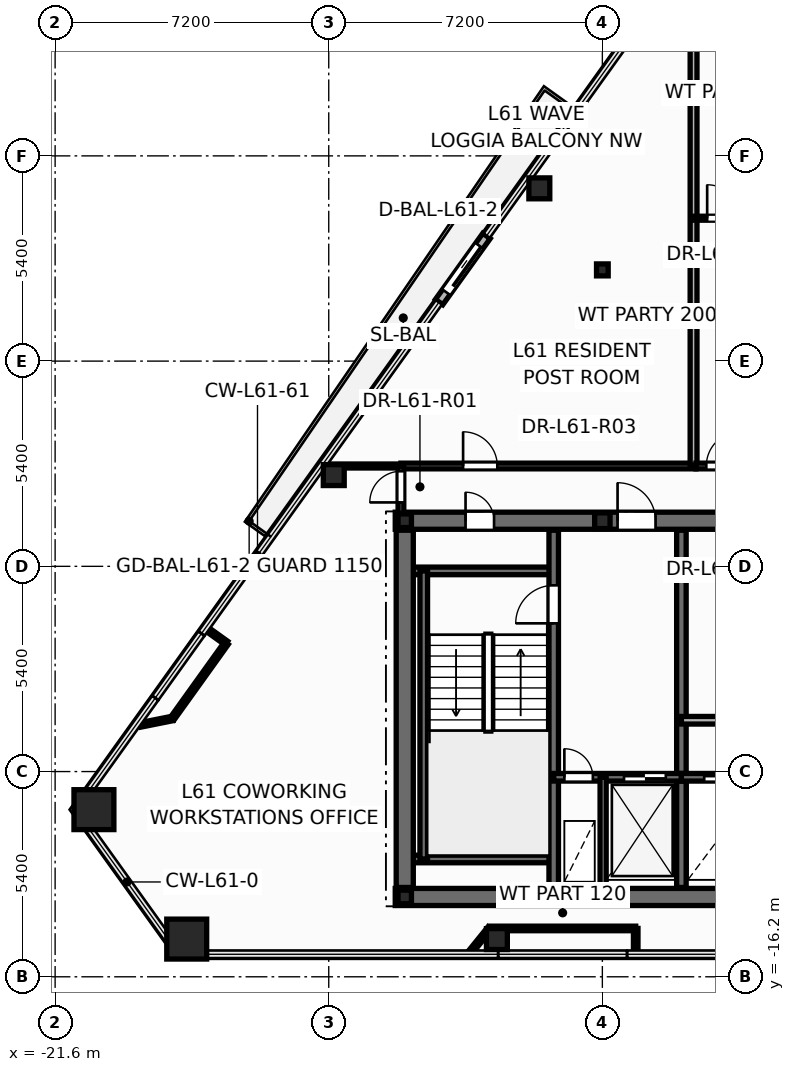
"""IFC4 building model, lengths in metres.
Left out: names, types, materials, properties, quantities, classifications, styles, units other than length and angle.
Written with IfcOpenShell. Run it as: python <this file> out.ifc"""

import sys

from ifc_helpers import new_model, si_unit, direction, frame, frame_2d, origin, origin_2d, place, context, subcontext, project, spatial, rectangle, hollow_rectangle, hollow_circle, i_section, extrude, element, fill, save


model = new_model("IFC4")
c1 = context("Model", 3, precision=1e-05, world=origin(), true_north=direction((0.0, 1.0)))
c2 = subcontext(c1, "Body", "Model", "MODEL_VIEW")
j1 = project(units=[si_unit("LENGTHUNIT", "METRE"), si_unit("PLANEANGLEUNIT", "RADIAN")], contexts=[c1])
p1 = place(None, origin())
s1 = spatial("IfcSite", under=j1, at=p1, CompositionType="ELEMENT")
p2 = place(p1, origin())
s2 = spatial("IfcBuilding", under=s1, at=p2, CompositionType="ELEMENT")
p3 = place(p2, frame((0.0, 0.0, 233.4)))
s3 = spatial("IfcBuildingStorey", under=s2, at=p3, CompositionType="ELEMENT", Elevation=233.4)
for number, where, z_axis, x_axis in (
    (1, (-20.579, -11.802, 0.0), (0.0, 0.0, 1.0), (1.0, 0.0, 0.0)),
    (2, (-18.137, -15.208, 0.0), (0.0, 0.0, 1.0), (1.0, 0.0, 0.0)),
):
    element("IfcColumn", number, at=place(p3, frame(where, z_axis=z_axis, x_axis=x_axis)), inside=s3, PredefinedType="COLUMN", context=c2, shape_type="SweptSolid", body=[
        extrude(hollow_rectangle(XDim=1.05, YDim=1.05, WallThickness=0.045, at=origin_2d()), origin(), (0.0, 0.0, 1.0), 3.6),
    ])
for number, where, z_axis, x_axis in (
    (3, (-9.976, -15.208, 0.0), (0.0, 0.0, 1.0), (1.0, 0.0, 0.0)),
    (4, (-8.858, 4.546, 0.0), (0.0, 0.0, 1.0), (1.0, 0.0, 0.0)),
    (5, (-14.268, -2.999, 0.0), (0.0, 0.0, 1.0), (1.0, 0.0, 0.0)),
):
    element("IfcColumn", number, at=place(p3, frame(where, z_axis=z_axis, x_axis=x_axis)), inside=s3, PredefinedType="COLUMN", context=c2, shape_type="SweptSolid", body=[
        extrude(hollow_circle(Radius=0.275, WallThickness=0.024, at=origin_2d()), origin(), (0.0, 0.0, 1.0), 3.6),
    ])
for number, where, z_axis, x_axis in (
    (6, (-12.4, -14.1, 0.0), (0.0, 0.0, 1.0), (1.0, 0.0, 0.0)),
    (7, (-12.4, -4.2, 0.0), (0.0, 0.0, 1.0), (1.0, 0.0, 0.0)),
):
    element("IfcColumn", number, at=place(p3, frame(where, z_axis=z_axis, x_axis=x_axis)), inside=s3, PredefinedType="COLUMN", context=c2, shape_type="SweptSolid", body=[
        extrude(i_section(OverallWidth=0.352, OverallDepth=0.359, WebThickness=0.018, FlangeThickness=0.026, at=origin_2d()), origin(), (0.0, 0.0, 1.0), 3.6),
    ])
p4 = place(p3, frame((-7.2, -4.2, 0.0), z_axis=(0.0, 0.0, 1.0), x_axis=(1.0, 0.0, 0.0)))
e8 = element("IfcColumn", 8, at=p4, inside=s3, PredefinedType="PILASTER", context=c2, shape_type="SweptSolid", body=[
    extrude(i_section(OverallWidth=0.405, OverallDepth=0.414, WebThickness=0.022, FlangeThickness=0.032, at=origin_2d()), origin(), (0.0, 0.0, 1.0), 3.6),
])
p5 = place(p3, frame((-7.2, 2.4, 0.0), z_axis=(0.0, 0.0, 1.0), x_axis=(1.0, 0.0, 0.0)))
e9 = element("IfcColumn", 9, at=p5, inside=s3, PredefinedType="COLUMN", context=c2, shape_type="SweptSolid", body=[
    extrude(i_section(OverallWidth=0.307, OverallDepth=0.314, WebThickness=0.012, FlangeThickness=0.019, at=origin_2d()), origin(), (0.0, 0.0, 1.0), 3.6),
])
p6 = place(p3, frame((-10.249, 3.293, -0.015), z_axis=(0.0, 0.0, 1.0), x_axis=(-0.58265081445, -0.812722602381, 0.0)))
e10 = element("IfcWall", 10, at=p6, inside=s3, PredefinedType="STANDARD", context=c2, shape_type="SweptSolid", body=[
    extrude(rectangle(XDim=2.14, YDim=0.24, at=frame_2d((1.07, 0.0))), origin(), (0.0, 0.0, 1.0), 2.878),
])
p7 = place(p6, frame((0.32, 0.0, 0.015)))
e11 = element("IfcOpeningElement", 11, at=p7, cuts=e10, PredefinedType="OPENING", context=c2, shape_type="SweptSolid", body=[
    extrude(rectangle(XDim=1.506, YDim=2.204, at=frame_2d((0.75, 1.102))), frame((0.0, 0.13, 0.0), z_axis=(0.0, -1.0, 0.0), x_axis=(1.0, 0.0, 0.0)), (0.0, 0.0, 1.0), 0.26),
])
p8 = place(p3, frame((-12.65, -14.1, 0.0), z_axis=(0.0, 0.0, 1.0), x_axis=(1.0, 0.0, 0.0)))
e12 = element("IfcWall", 12, at=p8, inside=s3, PredefinedType="SHEAR", context=c2, shape_type="SweptSolid", body=[
    extrude(rectangle(XDim=25.3, YDim=0.45, at=frame_2d((12.65, 0.0))), origin(), (0.0, 0.0, 1.0), 3.6),
])
p9 = place(p3, frame((-12.65, -4.2, 0.0), z_axis=(0.0, 0.0, 1.0), x_axis=(1.0, 0.0, 0.0)))
e13 = element("IfcWall", 13, at=p9, inside=s3, PredefinedType="SHEAR", context=c2, shape_type="SweptSolid", body=[
    extrude(rectangle(XDim=25.3, YDim=0.45, at=frame_2d((12.65, 0.0))), origin(), (0.0, 0.0, 1.0), 3.6),
])
p10 = place(p9, frame((1.85, 0.0, 0.0)))
e14 = element("IfcOpeningElement", 14, at=p10, cuts=e13, PredefinedType="OPENING", context=c2, shape_type="SweptSolid", body=[
    extrude(rectangle(XDim=0.756, YDim=2.054, at=frame_2d((0.375, 1.027))), frame((0.0, 0.235, 0.0), z_axis=(0.0, -1.0, 0.0), x_axis=(1.0, 0.0, 0.0)), (0.0, 0.0, 1.0), 0.47),
])
p11 = place(p9, frame((21.85, 0.0, 0.0)))
e15 = element("IfcOpeningElement", 15, at=p11, cuts=e13, PredefinedType="OPENING", context=c2, shape_type="SweptSolid", body=[
    extrude(rectangle(XDim=0.756, YDim=2.054, at=frame_2d((0.375, 1.027))), frame((0.0, 0.235, 0.0), z_axis=(0.0, -1.0, 0.0), x_axis=(1.0, 0.0, 0.0)), (0.0, 0.0, 1.0), 0.47),
])
p12 = place(p9, frame((23.5, 0.0, 0.0)))
e16 = element("IfcOpeningElement", 16, at=p12, cuts=e13, PredefinedType="OPENING", context=c2, shape_type="SweptSolid", body=[
    extrude(rectangle(XDim=0.756, YDim=2.054, at=frame_2d((0.375, 1.027))), frame((0.0, 0.235, 0.0), z_axis=(0.0, -1.0, 0.0), x_axis=(1.0, 0.0, 0.0)), (0.0, 0.0, 1.0), 0.47),
])
p13 = place(p9, frame((5.85, 0.0, 0.0)))
e17 = element("IfcOpeningElement", 17, at=p13, cuts=e13, PredefinedType="OPENING", context=c2, shape_type="SweptSolid", body=[
    extrude(rectangle(XDim=1.006, YDim=2.104, at=frame_2d((0.5, 1.052))), frame((0.0, 0.235, 0.0), z_axis=(0.0, -1.0, 0.0), x_axis=(1.0, 0.0, 0.0)), (0.0, 0.0, 1.0), 0.47),
])
p14 = place(p9, frame((10.35, 0.0, 0.0)))
e18 = element("IfcOpeningElement", 18, at=p14, cuts=e13, PredefinedType="OPENING", context=c2, shape_type="SweptSolid", body=[
    extrude(rectangle(XDim=1.406, YDim=2.154, at=frame_2d((0.7, 1.077))), frame((0.0, 0.235, 0.0), z_axis=(0.0, -1.0, 0.0), x_axis=(1.0, 0.0, 0.0)), (0.0, 0.0, 1.0), 0.47),
])
p15 = place(p9, frame((18.45, 0.0, 0.0)))
e19 = element("IfcOpeningElement", 19, at=p15, cuts=e13, PredefinedType="OPENING", context=c2, shape_type="SweptSolid", body=[
    extrude(rectangle(XDim=1.006, YDim=2.104, at=frame_2d((0.5, 1.052))), frame((0.0, 0.235, 0.0), z_axis=(0.0, -1.0, 0.0), x_axis=(1.0, 0.0, 0.0)), (0.0, 0.0, 1.0), 0.47),
])
for number, where, z_axis, x_axis in (
    (20, (-12.35, -5.52, 0.0), (0.0, 0.0, 1.0), (1.0, 0.0, 0.0)),
    (21, (-12.35, -13.1, 0.0), (0.0, 0.0, 1.0), (1.0, 0.0, 0.0)),
):
    element("IfcWall", number, at=place(p3, frame(where, z_axis=z_axis, x_axis=x_axis)), inside=s3, PredefinedType="SOLIDWALL", context=c2, shape_type="SweptSolid", body=[
        extrude(rectangle(XDim=3.87, YDim=0.2, at=frame_2d((1.935, 0.0))), origin(), (0.0, 0.0, 1.0), 3.6),
    ])
p16 = place(p3, frame((-11.9, -13.1, 0.0), z_axis=(0.0, 0.0, 1.0), x_axis=(0.0, 1.0, 0.0)))
e22 = element("IfcWall", 22, at=p16, inside=s3, PredefinedType="SOLIDWALL", context=c2, shape_type="SweptSolid", body=[
    extrude(rectangle(XDim=7.58, YDim=0.2, at=frame_2d((3.79, 0.0))), origin(), (0.0, 0.0, 1.0), 3.6),
])
p17 = place(p3, frame((-8.48, -13.85, 0.0), z_axis=(0.0, 0.0, 1.0), x_axis=(0.0, 1.0, 0.0)))
e23 = element("IfcWall", 23, at=p17, inside=s3, PredefinedType="SHEAR", context=c2, shape_type="SweptSolid", body=[
    extrude(rectangle(XDim=9.4, YDim=0.25, at=frame_2d((4.7, 0.0))), origin(), (0.0, 0.0, 1.0), 3.6),
])
p18 = place(p17, frame((6.95, 0.0, 0.0)))
e24 = element("IfcOpeningElement", 24, at=p18, cuts=e23, PredefinedType="OPENING", context=c2, shape_type="SweptSolid", body=[
    extrude(rectangle(XDim=1.006, YDim=2.104, at=frame_2d((0.5, 1.052))), frame((0.0, 0.135, 0.0), z_axis=(0.0, -1.0, 0.0), x_axis=(1.0, 0.0, 0.0)), (0.0, 0.0, 1.0), 0.27),
])
p19 = place(p3, frame((-5.12, -13.85, 0.0), z_axis=(0.0, 0.0, 1.0), x_axis=(0.0, 1.0, 0.0)))
e25 = element("IfcWall", 25, at=p19, inside=s3, PredefinedType="SHEAR", context=c2, shape_type="SweptSolid", body=[
    extrude(rectangle(XDim=9.4, YDim=0.25, at=frame_2d((4.7, 0.0))), origin(), (0.0, 0.0, 1.0), 3.6),
])
p20 = place(p3, frame((-8.48, -10.95, 0.0), z_axis=(0.0, 0.0, 1.0), x_axis=(1.0, 0.0, 0.0)))
e26 = element("IfcWall", 26, at=p20, inside=s3, PredefinedType="SOLIDWALL", context=c2, shape_type="SweptSolid", body=[
    extrude(rectangle(XDim=3.36, YDim=0.2, at=frame_2d((1.68, 0.0))), origin(), (0.0, 0.0, 1.0), 3.6),
])
p21 = place(p20, frame((0.28, 0.0, 0.0)))
e27 = element("IfcOpeningElement", 27, at=p21, cuts=e26, PredefinedType="OPENING", context=c2, shape_type="SweptSolid", body=[
    extrude(rectangle(XDim=0.756, YDim=2.054, at=frame_2d((0.375, 1.027))), frame((0.0, 0.11, 0.0), z_axis=(0.0, -1.0, 0.0), x_axis=(1.0, 0.0, 0.0)), (0.0, 0.0, 1.0), 0.22),
])
p22 = place(p20, frame((1.85, 0.0, 0.0)))
e28 = element("IfcOpeningElement", 28, at=p22, cuts=e26, PredefinedType="OPENING", context=c2, shape_type="SweptSolid", body=[
    extrude(rectangle(XDim=1.106, YDim=2.104, at=frame_2d((0.55, 1.052))), frame((0.0, 0.11, 0.0), z_axis=(0.0, -1.0, 0.0), x_axis=(1.0, 0.0, 0.0)), (0.0, 0.0, 1.0), 0.22),
])
p23 = place(p3, frame((-5.12, -10.95, 0.0), z_axis=(0.0, 0.0, 1.0), x_axis=(1.0, 0.0, 0.0)))
e29 = element("IfcWall", 29, at=p23, inside=s3, PredefinedType="SOLIDWALL", context=c2, shape_type="SweptSolid", body=[
    extrude(rectangle(XDim=10.24, YDim=0.2, at=frame_2d((5.12, 0.0))), origin(), (0.0, 0.0, 1.0), 3.6),
])
p24 = place(p23, frame((0.6, 0.0, 0.0)))
e30 = element("IfcOpeningElement", 30, at=p24, cuts=e29, PredefinedType="OPENING", context=c2, shape_type="SweptSolid", body=[
    extrude(rectangle(XDim=1.106, YDim=2.104, at=frame_2d((0.55, 1.052))), frame((0.0, 0.11, 0.0), z_axis=(0.0, -1.0, 0.0), x_axis=(1.0, 0.0, 0.0)), (0.0, 0.0, 1.0), 0.22),
])
p25 = place(p23, frame((2.67, 0.0, 0.0)))
e31 = element("IfcOpeningElement", 31, at=p25, cuts=e29, PredefinedType="OPENING", context=c2, shape_type="SweptSolid", body=[
    extrude(rectangle(XDim=1.106, YDim=2.104, at=frame_2d((0.55, 1.052))), frame((0.0, 0.11, 0.0), z_axis=(0.0, -1.0, 0.0), x_axis=(1.0, 0.0, 0.0)), (0.0, 0.0, 1.0), 0.22),
])
p26 = place(p23, frame((4.57, 0.0, 0.0)))
e32 = element("IfcOpeningElement", 32, at=p26, cuts=e29, PredefinedType="OPENING", context=c2, shape_type="SweptSolid", body=[
    extrude(rectangle(XDim=1.106, YDim=2.104, at=frame_2d((0.55, 1.052))), frame((0.0, 0.11, 0.0), z_axis=(0.0, -1.0, 0.0), x_axis=(1.0, 0.0, 0.0)), (0.0, 0.0, 1.0), 0.22),
])
p27 = place(p23, frame((6.47, 0.0, 0.0)))
e33 = element("IfcOpeningElement", 33, at=p27, cuts=e29, PredefinedType="OPENING", context=c2, shape_type="SweptSolid", body=[
    extrude(rectangle(XDim=1.106, YDim=2.104, at=frame_2d((0.55, 1.052))), frame((0.0, 0.11, 0.0), z_axis=(0.0, -1.0, 0.0), x_axis=(1.0, 0.0, 0.0)), (0.0, 0.0, 1.0), 0.22),
])
p28 = place(p23, frame((8.54, 0.0, 0.0)))
e34 = element("IfcOpeningElement", 34, at=p28, cuts=e29, PredefinedType="OPENING", context=c2, shape_type="SweptSolid", body=[
    extrude(rectangle(XDim=1.106, YDim=2.104, at=frame_2d((0.55, 1.052))), frame((0.0, 0.11, 0.0), z_axis=(0.0, -1.0, 0.0), x_axis=(1.0, 0.0, 0.0)), (0.0, 0.0, 1.0), 0.22),
])
p29 = place(p3, frame((-7.18, -13.85, 0.0), z_axis=(0.0, 0.0, 1.0), x_axis=(0.0, 1.0, 0.0)))
e35 = element("IfcWall", 35, at=p29, inside=s3, PredefinedType="PARTITIONING", context=c2, shape_type="SweptSolid", body=[
    extrude(rectangle(XDim=2.9, YDim=0.16, at=frame_2d((1.45, 0.0))), origin(), (0.0, 0.0, 1.0), 2.57),
])
p30 = place(p3, frame((-12.4, -13.85, 0.0), z_axis=(0.0, 0.0, 1.0), x_axis=(0.0, 1.0, 0.0)))
e36 = element("IfcWall", 36, at=p30, inside=s3, PredefinedType="SHEAR", context=c2, shape_type="SweptSolid", body=[
    extrude(rectangle(XDim=9.4, YDim=0.45, at=frame_2d((4.7, 0.0))), origin(), (0.0, 0.0, 1.0), 3.6),
])
p31 = place(p3, frame((-5.12, -9.45, 0.0), z_axis=(0.0, 0.0, 1.0), x_axis=(1.0, 0.0, 0.0)))
e37 = element("IfcWall", 37, at=p31, inside=s3, PredefinedType="SOLIDWALL", context=c2, shape_type="SweptSolid", body=[
    extrude(rectangle(XDim=2.24, YDim=0.2, at=frame_2d((1.12, 0.0))), origin(), (0.0, 0.0, 1.0), 3.345),
])
p32 = place(p3, frame((-12.5, -2.76, 0.0), z_axis=(0.0, 0.0, 1.0), x_axis=(1.0, 0.0, 0.0)))
e38 = element("IfcWall", 38, at=p32, inside=s3, PredefinedType="PARTITIONING", context=c2, shape_type="SweptSolid", body=[
    extrude(rectangle(XDim=7.76, YDim=0.15, at=frame_2d((3.88, 0.0))), origin(), (0.0, 0.0, 1.0), 2.32),
])
p33 = place(p32, frame((1.635, 0.0, 0.0)))
e39 = element("IfcOpeningElement", 39, at=p33, cuts=e38, PredefinedType="OPENING", context=c2, shape_type="SweptSolid", body=[
    extrude(rectangle(XDim=0.906, YDim=2.104, at=frame_2d((0.45, 1.052))), frame((0.0, 0.085, 0.0), z_axis=(0.0, -1.0, 0.0), x_axis=(1.0, 0.0, 0.0)), (0.0, 0.0, 1.0), 0.17),
])
p34 = place(p3, frame((-4.8, -2.74, 0.0), z_axis=(0.0, 0.0, 1.0), x_axis=(0.0, 1.0, 0.0)))
e40 = element("IfcWall", 40, at=p34, inside=s3, PredefinedType="PARTITIONING", context=c2, shape_type="SweptSolid", body=[
    extrude(rectangle(XDim=13.633, YDim=0.18, at=frame_2d((6.817, 0.0))), origin(), (0.0, 0.0, 1.0), 2.32),
])
p35 = place(p3, frame((-10.167, -14.928, 0.0), z_axis=(0.0, 0.0, 1.0), x_axis=(1.0, 0.0, 0.0)))
e41 = element("IfcWall", 41, at=p35, inside=s3, PredefinedType="PARTITIONING", context=c2, shape_type="SweptSolid", body=[
    extrude(rectangle(XDim=3.845, YDim=0.12, at=frame_2d((1.922, 0.0))), origin(), (0.0, 0.0, 1.0), 2.863),
])
p36 = place(p3, frame((-4.738, -2.76, 0.0), z_axis=(0.0, 0.0, 1.0), x_axis=(1.0, 0.0, 0.0)))
e42 = element("IfcWall", 42, at=p36, inside=s3, PredefinedType="PARTITIONING", context=c2, shape_type="SweptSolid", body=[
    extrude(rectangle(XDim=3.298, YDim=0.15, at=frame_2d((1.649, 0.0))), origin(), (0.0, 0.0, 1.0), 2.965),
])
p37 = place(p36, frame((0.273, 0.0, 0.0)))
e43 = element("IfcOpeningElement", 43, at=p37, cuts=e42, PredefinedType="OPENING", context=c2, shape_type="SweptSolid", body=[
    extrude(rectangle(XDim=0.906, YDim=2.104, at=frame_2d((0.45, 1.052))), frame((0.0, 0.085, 0.0), z_axis=(0.0, -1.0, 0.0), x_axis=(1.0, 0.0, 0.0)), (0.0, 0.0, 1.0), 0.17),
])
p38 = place(p3, frame((-4.8, 3.76, 0.0), z_axis=(0.0, 0.0, 1.0), x_axis=(1.0, 0.0, 0.0)))
e44 = element("IfcWall", 44, at=p38, inside=s3, PredefinedType="PARTITIONING", context=c2, shape_type="SweptSolid", body=[
    extrude(rectangle(XDim=3.3, YDim=0.105, at=frame_2d((1.65, 0.0))), origin(), (0.0, 0.0, 1.0), 2.965),
])
p39 = place(p38, frame((0.358, 0.0, 0.0)))
e45 = element("IfcOpeningElement", 45, at=p39, cuts=e44, PredefinedType="OPENING", context=c2, shape_type="SweptSolid", body=[
    extrude(rectangle(XDim=0.886, YDim=2.104, at=frame_2d((0.44, 1.052))), frame((0.0, 0.062, 0.0), z_axis=(0.0, -1.0, 0.0), x_axis=(1.0, 0.0, 0.0)), (0.0, 0.0, 1.0), 0.125),
])
p40 = place(p3, frame((-17.093, -7.42, 0.0), z_axis=(0.0, 0.0, 1.0), x_axis=(-0.58269400411, -0.812691637446, 0.0)))
e46 = element("IfcWall", 46, at=p40, inside=s3, PredefinedType="PARTITIONING", context=c2, shape_type="SweptSolid", body=[
    extrude(rectangle(XDim=2.441, YDim=0.12, at=frame_2d((1.221, 0.0))), origin(), (0.0, 0.0, 1.0), 3.345),
])
p41 = place(p3, frame((-14.588, -2.76, 0.0), z_axis=(0.0, 0.0, 1.0), x_axis=(1.0, 0.0, 0.0)))
e47 = element("IfcWall", 47, at=p41, inside=s3, PredefinedType="PARTITIONING", context=c2, shape_type="SweptSolid", body=[
    extrude(rectangle(XDim=2.088, YDim=0.105, at=frame_2d((1.044, 0.0))), origin(), (0.0, 0.0, 1.0), 2.62),
])
p42 = place(p3, frame((-12.5, -4.24, 0.0), z_axis=(0.0, 0.0, 1.0), x_axis=(0.0, 1.0, 0.0)))
e48 = element("IfcWall", 48, at=p42, inside=s3, PredefinedType="PARTITIONING", context=c2, shape_type="SweptSolid", body=[
    extrude(rectangle(XDim=1.48, YDim=0.15, at=frame_2d((0.74, 0.0))), origin(), (0.0, 0.0, 1.0), 2.32),
])
p43 = place(p42, frame((0.522, 0.0, 0.0)))
e49 = element("IfcOpeningElement", 49, at=p43, cuts=e48, PredefinedType="OPENING", context=c2, shape_type="SweptSolid", body=[
    extrude(rectangle(XDim=0.826, YDim=2.104, at=frame_2d((0.41, 1.052))), frame((0.0, 0.085, 0.0), z_axis=(0.0, -1.0, 0.0), x_axis=(1.0, 0.0, 0.0)), (0.0, 0.0, 1.0), 0.17),
])
p44 = place(p3, frame((-10.71, -15.598, 0.0), z_axis=(0.0, 0.0, 1.0), x_axis=(0.629344812131, 0.77712618502, 0.0)))
e50 = element("IfcWall", 50, at=p44, inside=s3, PredefinedType="PARTITIONING", context=c2, shape_type="SweptSolid", body=[
    extrude(rectangle(XDim=0.862, YDim=0.12, at=frame_2d((0.431, 0.0))), origin(), (0.0, 0.0, 1.0), 2.863),
])
p45 = place(p3, frame((-18.515, -9.404, 0.0), z_axis=(0.0, 0.0, 1.0), x_axis=(-0.980525420843, -0.196392207279, 0.0)))
e51 = element("IfcWall", 51, at=p45, inside=s3, PredefinedType="PARTITIONING", context=c2, shape_type="SweptSolid", body=[
    extrude(rectangle(XDim=0.85, YDim=0.12, at=frame_2d((0.425, 0.0))), origin(), (0.0, 0.0, 1.0), 2.863),
])
p46 = place(p3, frame((-6.323, -14.928, 0.0), z_axis=(0.0, 0.0, 1.0), x_axis=(0.0, -1.0, 0.0)))
e52 = element("IfcWall", 52, at=p46, inside=s3, PredefinedType="PARTITIONING", context=c2, shape_type="SweptSolid", body=[
    extrude(rectangle(XDim=0.67, YDim=0.12, at=frame_2d((0.335, 0.0))), origin(), (0.0, 0.0, 1.0), 2.863),
])
p47 = place(p3, frame((-17.637, -7.03, 0.0), z_axis=(0.0, 0.0, 1.0), x_axis=(0.812673311452, -0.582719562786, 0.0)))
e53 = element("IfcWall", 53, at=p47, inside=s3, PredefinedType="PARTITIONING", context=c2, shape_type="SweptSolid", body=[
    extrude(rectangle(XDim=0.67, YDim=0.12, at=frame_2d((0.335, 0.0))), origin(), (0.0, 0.0, 1.0), 2.863),
])
p48 = place(p7, origin())
e54 = element("IfcDoor", 54, at=p48, inside=s3, OperationType="SLIDING_TO_RIGHT", PredefinedType="DOOR", context=c2, shape_type="SweptSolid", body=[
    extrude(rectangle(XDim=1.5, YDim=2.2, at=frame_2d((0.75, 1.1))), frame((0.0, 0.025, 0.0), z_axis=(0.0, -1.0, 0.0), x_axis=(1.0, 0.0, 0.0)), (0.0, 0.0, 1.0), 0.05),
])
fill(e11, e54)
p49 = place(p18, origin())
e55 = element("IfcDoor", 55, at=p49, inside=s3, OperationType="SINGLE_SWING_LEFT", PredefinedType="DOOR", context=c2, shape_type="SweptSolid", body=[
    extrude(rectangle(XDim=1.0, YDim=2.1, at=frame_2d((0.5, 1.05))), frame((0.0, 0.025, 0.0), z_axis=(0.0, -1.0, 0.0), x_axis=(1.0, 0.0, 0.0)), (0.0, 0.0, 1.0), 0.05),
])
fill(e24, e55)
p50 = place(p21, origin())
e56 = element("IfcDoor", 56, at=p50, inside=s3, OperationType="SINGLE_SWING_LEFT", PredefinedType="DOOR", context=c2, shape_type="SweptSolid", body=[
    extrude(rectangle(XDim=0.75, YDim=2.05, at=frame_2d((0.375, 1.025))), frame((0.0, 0.025, 0.0), z_axis=(0.0, -1.0, 0.0), x_axis=(1.0, 0.0, 0.0)), (0.0, 0.0, 1.0), 0.05),
])
fill(e27, e56)
p51 = place(p22, origin())
e57 = element("IfcDoor", 57, at=p51, inside=s3, OperationType="DOUBLE_DOOR_SLIDING", PredefinedType="DOOR", context=c2, shape_type="SweptSolid", body=[
    extrude(rectangle(XDim=1.1, YDim=2.1, at=frame_2d((0.55, 1.05))), frame((0.0, 0.025, 0.0), z_axis=(0.0, -1.0, 0.0), x_axis=(1.0, 0.0, 0.0)), (0.0, 0.0, 1.0), 0.05),
])
fill(e28, e57)
p52 = place(p24, origin())
e58 = element("IfcDoor", 58, at=p52, inside=s3, OperationType="DOUBLE_DOOR_SLIDING", PredefinedType="DOOR", context=c2, shape_type="SweptSolid", body=[
    extrude(rectangle(XDim=1.1, YDim=2.1, at=frame_2d((0.55, 1.05))), frame((0.0, 0.025, 0.0), z_axis=(0.0, -1.0, 0.0), x_axis=(1.0, 0.0, 0.0)), (0.0, 0.0, 1.0), 0.05),
])
fill(e30, e58)
p53 = place(p10, origin())
e59 = element("IfcDoor", 59, at=p53, inside=s3, OperationType="SINGLE_SWING_LEFT", PredefinedType="DOOR", context=c2, shape_type="SweptSolid", body=[
    extrude(rectangle(XDim=0.75, YDim=2.05, at=frame_2d((0.375, 1.025))), frame((0.0, 0.025, 0.0), z_axis=(0.0, -1.0, 0.0), x_axis=(1.0, 0.0, 0.0)), (0.0, 0.0, 1.0), 0.05),
])
fill(e14, e59)
p54 = place(p13, origin())
e60 = element("IfcDoor", 60, at=p54, inside=s3, OperationType="SINGLE_SWING_LEFT", PredefinedType="DOOR", context=c2, shape_type="SweptSolid", body=[
    extrude(rectangle(XDim=1.0, YDim=2.1, at=frame_2d((0.5, 1.05))), frame((0.0, 0.025, 0.0), z_axis=(0.0, -1.0, 0.0), x_axis=(1.0, 0.0, 0.0)), (0.0, 0.0, 1.0), 0.05),
])
fill(e17, e60)
p55 = place(p43, origin())
e61 = element("IfcDoor", 61, at=p55, inside=s3, OperationType="SINGLE_SWING_LEFT", PredefinedType="DOOR", context=c2, shape_type="SweptSolid", body=[
    extrude(rectangle(XDim=0.82, YDim=2.1, at=frame_2d((0.41, 1.05))), frame((0.0, 0.025, 0.0), z_axis=(0.0, -1.0, 0.0), x_axis=(1.0, 0.0, 0.0)), (0.0, 0.0, 1.0), 0.05),
])
fill(e49, e61)
p56 = place(p33, origin())
e62 = element("IfcDoor", 62, at=p56, inside=s3, OperationType="SINGLE_SWING_LEFT", PredefinedType="DOOR", context=c2, shape_type="SweptSolid", body=[
    extrude(rectangle(XDim=0.9, YDim=2.1, at=frame_2d((0.45, 1.05))), frame((0.0, 0.025, 0.0), z_axis=(0.0, -1.0, 0.0), x_axis=(1.0, 0.0, 0.0)), (0.0, 0.0, 1.0), 0.05),
])
fill(e39, e62)
p57 = place(p37, origin())
e63 = element("IfcDoor", 63, at=p57, inside=s3, OperationType="SINGLE_SWING_RIGHT", PredefinedType="DOOR", context=c2, shape_type="SweptSolid", body=[
    extrude(rectangle(XDim=0.9, YDim=2.1, at=frame_2d((0.45, 1.05))), frame((0.0, 0.025, 0.0), z_axis=(0.0, -1.0, 0.0), x_axis=(1.0, 0.0, 0.0)), (0.0, 0.0, 1.0), 0.05),
])
fill(e43, e63)
p58 = place(p39, origin())
e64 = element("IfcDoor", 64, at=p58, inside=s3, OperationType="SINGLE_SWING_LEFT", PredefinedType="DOOR", context=c2, shape_type="SweptSolid", body=[
    extrude(rectangle(XDim=0.88, YDim=2.1, at=frame_2d((0.44, 1.05))), frame((0.0, 0.025, 0.0), z_axis=(0.0, -1.0, 0.0), x_axis=(1.0, 0.0, 0.0)), (0.0, 0.0, 1.0), 0.05),
])
fill(e45, e64)
save(model, sys.argv[1])
